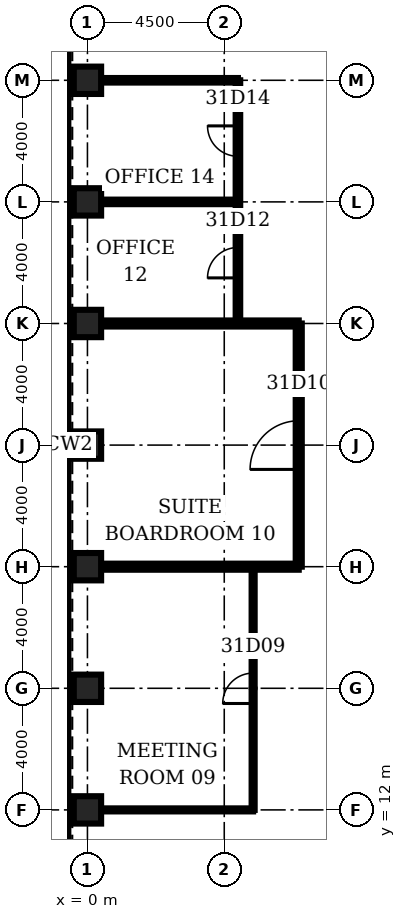
"""IFC4 building model, lengths in metres.
Left out: names, types, materials, properties, quantities, classifications, styles, units other than length and angle.
Written with IfcOpenShell. Run it as: python <this file> out.ifc"""

import sys

from ifc_helpers import new_model, si_unit, direction, frame, frame_2d, origin, origin_2d, place, context, subcontext, project, spatial, rectangle, hollow_rectangle, extrude, element, fill, save


model = new_model("IFC4")
c1 = context("Model", 3, precision=1e-05, world=origin(), true_north=direction((0.0, 1.0)))
c2 = subcontext(c1, "Body", "Model", "MODEL_VIEW")
j1 = project(units=[si_unit("LENGTHUNIT", "METRE"), si_unit("PLANEANGLEUNIT", "RADIAN")], contexts=[c1])
p1 = place(None, origin())
s1 = spatial("IfcSite", under=j1, at=p1, CompositionType="ELEMENT")
p2 = place(p1, origin())
s2 = spatial("IfcBuilding", under=s1, at=p2, CompositionType="ELEMENT")
p3 = place(p2, frame((0.0, 0.0, 142.5)))
s3 = spatial("IfcBuildingStorey", under=s2, at=p3, CompositionType="ELEMENT", Elevation=142.5)
for number, where, z_axis, x_axis in (
    (1, (0.0, 36.0, 0.0), (0.0, 0.0, 1.0), (1.0, 0.0, 0.0)),
    (2, (0.0, 32.0, 0.0), (0.0, 0.0, 1.0), (1.0, 0.0, 0.0)),
    (3, (0.0, 28.0, 0.0), (0.0, 0.0, 1.0), (1.0, 0.0, 0.0)),
    (4, (0.0, 24.0, 0.0), (0.0, 0.0, 1.0), (1.0, 0.0, 0.0)),
    (5, (0.0, 20.0, 0.0), (0.0, 0.0, 1.0), (1.0, 0.0, 0.0)),
    (6, (0.0, 16.0, 0.0), (0.0, 0.0, 1.0), (1.0, 0.0, 0.0)),
    (7, (0.0, 12.0, 0.0), (0.0, 0.0, 1.0), (1.0, 0.0, 0.0)),
):
    element("IfcColumn", number, at=place(p3, frame(where, z_axis=z_axis, x_axis=x_axis)), inside=s3, PredefinedType="COLUMN", context=c2, shape_type="SweptSolid", body=[
        extrude(hollow_rectangle(XDim=0.9, YDim=0.9, WallThickness=0.1, at=origin_2d()), origin(), (0.0, 0.0, 1.0), 4.2),
    ])
p4 = place(p3, frame((0.45, 12.0, 0.0), z_axis=(0.0, 0.0, 1.0), x_axis=(1.0, 0.0, 0.0)))
e8 = element("IfcWall", 8, at=p4, inside=s3, PredefinedType="PARTITIONING", context=c2, shape_type="SweptSolid", body=[
    extrude(rectangle(XDim=5.0, YDim=0.1, at=frame_2d((2.5, 0.0))), origin(), (0.0, 0.0, 1.0), 3.0),
])
for number, where, z_axis, x_axis in (
    (9, (0.45, 20.0, 0.0), (0.0, 0.0, 1.0), (1.0, 0.0, 0.0)),
    (10, (0.45, 28.0, 0.0), (0.0, 0.0, 1.0), (1.0, 0.0, 0.0)),
):
    element("IfcWall", number, at=place(p3, frame(where, z_axis=z_axis, x_axis=x_axis)), inside=s3, PredefinedType="PARTITIONING", context=c2, shape_type="SweptSolid", body=[
        extrude(rectangle(XDim=6.5, YDim=0.2, at=frame_2d((3.25, 0.0))), origin(), (0.0, 0.0, 1.0), 3.0),
    ])
for number, where, z_axis, x_axis in (
    (11, (0.45, 32.0, 0.0), (0.0, 0.0, 1.0), (1.0, 0.0, 0.0)),
    (12, (0.45, 36.0, 0.0), (0.0, 0.0, 1.0), (1.0, 0.0, 0.0)),
):
    element("IfcWall", number, at=place(p3, frame(where, z_axis=z_axis, x_axis=x_axis)), inside=s3, PredefinedType="PARTITIONING", context=c2, shape_type="SweptSolid", body=[
        extrude(rectangle(XDim=4.5, YDim=0.15, at=frame_2d((2.25, 0.0))), origin(), (0.0, 0.0, 1.0), 3.0),
    ])
p5 = place(p3, frame((4.95, 28.0, 0.0), z_axis=(0.0, 0.0, 1.0), x_axis=(0.0, 1.0, 0.0)))
e13 = element("IfcWall", 13, at=p5, inside=s3, PredefinedType="PARTITIONING", context=c2, shape_type="SweptSolid", body=[
    extrude(rectangle(XDim=8.0, YDim=0.15, at=frame_2d((4.0, 0.0))), origin(), (0.0, 0.0, 1.0), 3.0),
])
p6 = place(p5, frame((1.5, 0.0, 0.0)))
e14 = element("IfcOpeningElement", 14, at=p6, cuts=e13, PredefinedType="OPENING", context=c2, shape_type="SweptSolid", body=[
    extrude(rectangle(XDim=1.0, YDim=2.1, at=frame_2d((0.5, 1.05))), frame((0.0, 0.085, 0.0), z_axis=(0.0, -1.0, 0.0), x_axis=(1.0, 0.0, 0.0)), (0.0, 0.0, 1.0), 0.17),
])
p7 = place(p5, frame((5.5, 0.0, 0.0)))
e15 = element("IfcOpeningElement", 15, at=p7, cuts=e13, PredefinedType="OPENING", context=c2, shape_type="SweptSolid", body=[
    extrude(rectangle(XDim=1.0, YDim=2.1, at=frame_2d((0.5, 1.05))), frame((0.0, 0.085, 0.0), z_axis=(0.0, -1.0, 0.0), x_axis=(1.0, 0.0, 0.0)), (0.0, 0.0, 1.0), 0.17),
])
p8 = place(p3, frame((5.45, 12.0, 0.0), z_axis=(0.0, 0.0, 1.0), x_axis=(0.0, 1.0, 0.0)))
e16 = element("IfcWall", 16, at=p8, inside=s3, PredefinedType="PARTITIONING", context=c2, shape_type="SweptSolid", body=[
    extrude(rectangle(XDim=8.0, YDim=0.1, at=frame_2d((4.0, 0.0))), origin(), (0.0, 0.0, 1.0), 3.0),
])
p9 = place(p8, frame((3.5, 0.0, 0.0)))
e17 = element("IfcOpeningElement", 17, at=p9, cuts=e16, PredefinedType="OPENING", context=c2, shape_type="SweptSolid", body=[
    extrude(rectangle(XDim=1.0, YDim=2.1, at=frame_2d((0.5, 1.05))), frame((0.0, 0.06, 0.0), z_axis=(0.0, -1.0, 0.0), x_axis=(1.0, 0.0, 0.0)), (0.0, 0.0, 1.0), 0.12),
])
p10 = place(p3, frame((6.95, 20.0, 0.0), z_axis=(0.0, 0.0, 1.0), x_axis=(0.0, 1.0, 0.0)))
e18 = element("IfcWall", 18, at=p10, inside=s3, PredefinedType="PARTITIONING", context=c2, shape_type="SweptSolid", body=[
    extrude(rectangle(XDim=8.0, YDim=0.2, at=frame_2d((4.0, 0.0))), origin(), (0.0, 0.0, 1.0), 3.0),
])
p11 = place(p10, frame((3.2, 0.0, 0.0)))
e19 = element("IfcOpeningElement", 19, at=p11, cuts=e18, PredefinedType="OPENING", context=c2, shape_type="SweptSolid", body=[
    extrude(rectangle(XDim=1.6, YDim=2.1, at=frame_2d((0.8, 1.05))), frame((0.0, 0.11, 0.0), z_axis=(0.0, -1.0, 0.0), x_axis=(1.0, 0.0, 0.0)), (0.0, 0.0, 1.0), 0.22),
])
p12 = place(p9, origin())
e20 = element("IfcDoor", 20, at=p12, inside=s3, OperationType="SINGLE_SWING_LEFT", PredefinedType="DOOR", context=c2, shape_type="SweptSolid", body=[
    extrude(rectangle(XDim=1.0, YDim=2.1, at=frame_2d((0.5, 1.05))), frame((0.0, 0.025, 0.0), z_axis=(0.0, -1.0, 0.0), x_axis=(1.0, 0.0, 0.0)), (0.0, 0.0, 1.0), 0.05),
])
fill(e17, e20)
p13 = place(p11, origin())
e21 = element("IfcDoor", 21, at=p13, inside=s3, OperationType="SINGLE_SWING_LEFT", PredefinedType="DOOR", context=c2, shape_type="SweptSolid", body=[
    extrude(rectangle(XDim=1.6, YDim=2.1, at=frame_2d((0.8, 1.05))), frame((0.0, 0.025, 0.0), z_axis=(0.0, -1.0, 0.0), x_axis=(1.0, 0.0, 0.0)), (0.0, 0.0, 1.0), 0.05),
])
fill(e19, e21)
p14 = place(p6, origin())
e22 = element("IfcDoor", 22, at=p14, inside=s3, OperationType="SINGLE_SWING_LEFT", PredefinedType="DOOR", context=c2, shape_type="SweptSolid", body=[
    extrude(rectangle(XDim=1.0, YDim=2.1, at=frame_2d((0.5, 1.05))), frame((0.0, 0.025, 0.0), z_axis=(0.0, -1.0, 0.0), x_axis=(1.0, 0.0, 0.0)), (0.0, 0.0, 1.0), 0.05),
])
fill(e14, e22)
p15 = place(p7, origin())
e23 = element("IfcDoor", 23, at=p15, inside=s3, OperationType="SINGLE_SWING_RIGHT", PredefinedType="DOOR", context=c2, shape_type="SweptSolid", body=[
    extrude(rectangle(XDim=1.0, YDim=2.1, at=frame_2d((0.5, 1.05))), frame((0.0, 0.025, 0.0), z_axis=(0.0, -1.0, 0.0), x_axis=(1.0, 0.0, 0.0)), (0.0, 0.0, 1.0), 0.05),
])
fill(e15, e23)
save(model, sys.argv[1])
